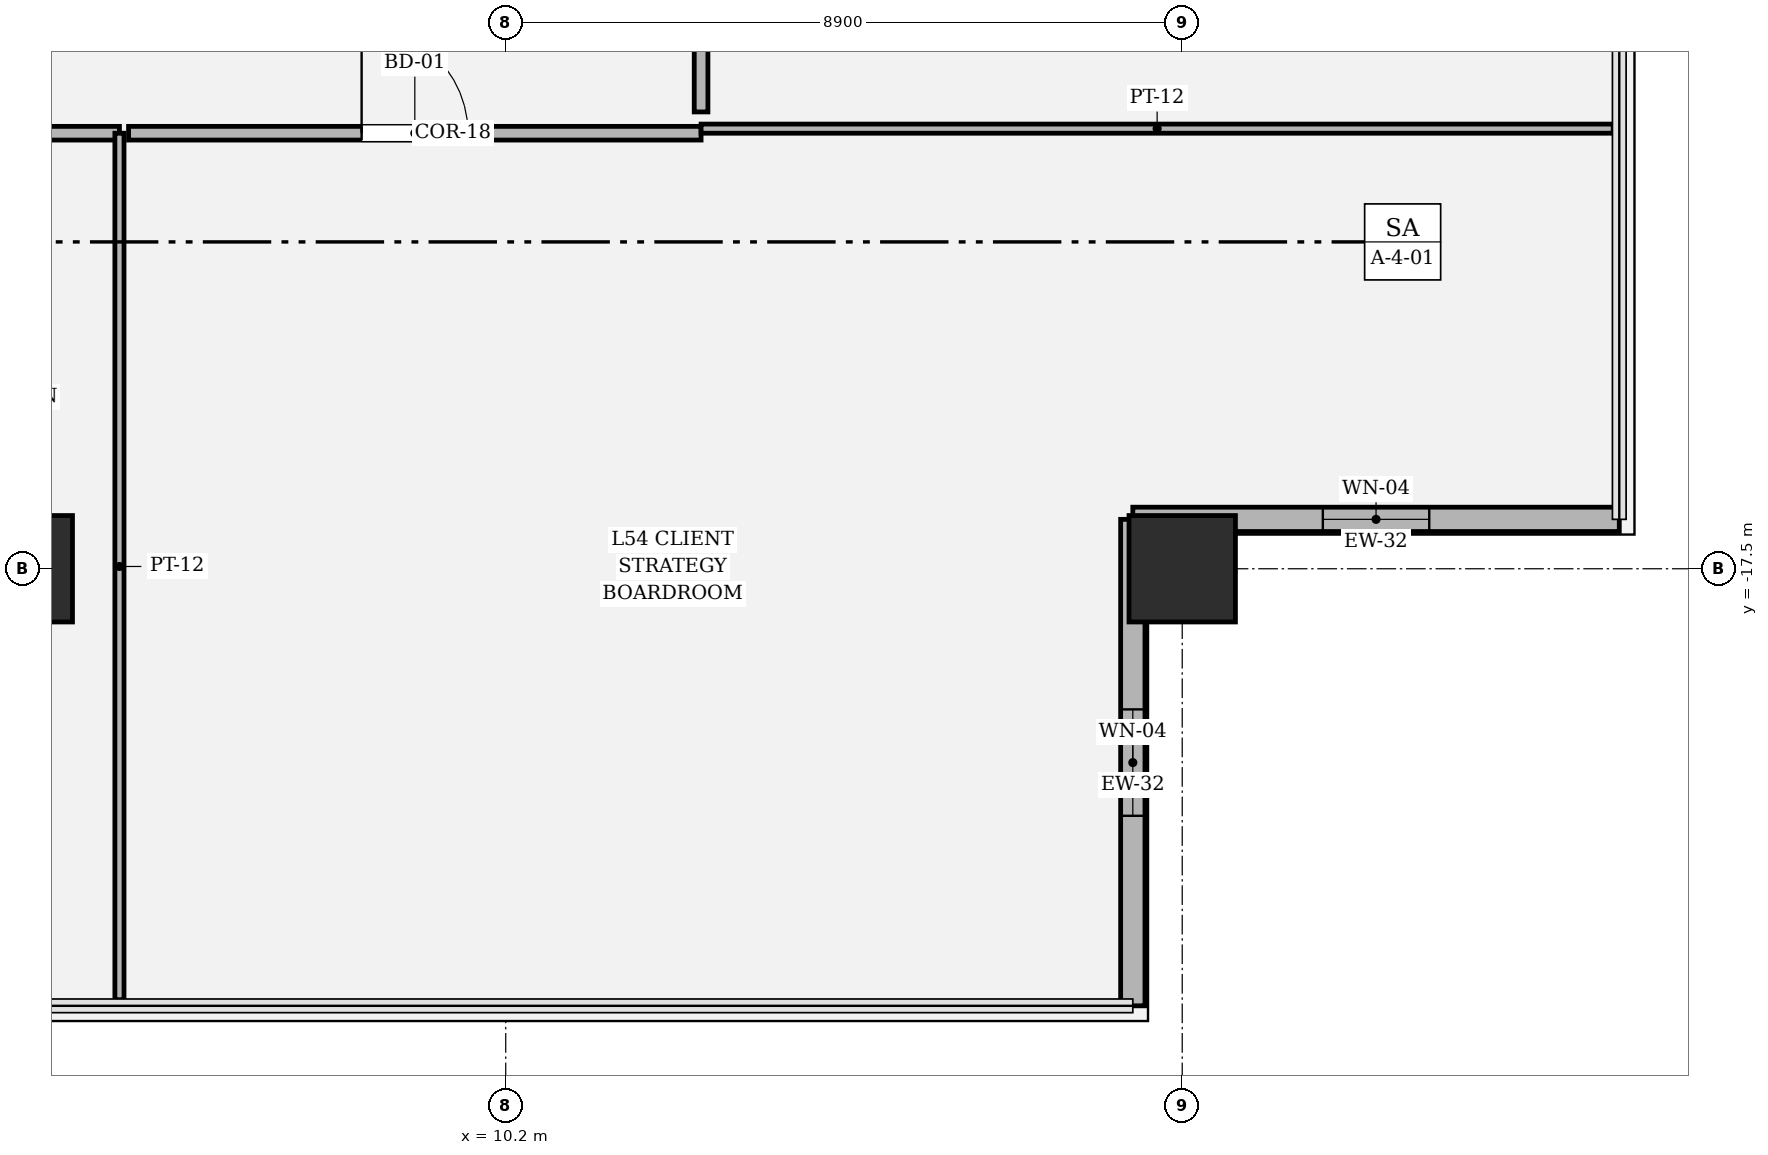
"""IFC4 building model, lengths in metres.
Left out: names, types, materials, properties, quantities, classifications, styles, units other than length and angle.
Written with IfcOpenShell. Run it as: python <this file> out.ifc"""

import sys

from ifc_helpers import new_model, si_unit, direction, frame, frame_2d, origin, origin_2d, place, context, subcontext, project, spatial, rectangle, hollow_rectangle, extrude, element, fill, save


model = new_model("IFC4")
c1 = context("Model", 3, precision=1e-05, world=origin(), true_north=direction((0.0, 1.0)))
c2 = subcontext(c1, "Body", "Model", "MODEL_VIEW")
j1 = project(units=[si_unit("LENGTHUNIT", "METRE"), si_unit("PLANEANGLEUNIT", "RADIAN")], contexts=[c1])
p1 = place(None, origin())
s1 = spatial("IfcSite", under=j1, at=p1, CompositionType="ELEMENT")
p2 = place(p1, origin())
s2 = spatial("IfcBuilding", under=s1, at=p2, CompositionType="ELEMENT")
p3 = place(p2, frame((0.0, 0.0, 228.9)))
s3 = spatial("IfcBuildingStorey", under=s2, at=p3, CompositionType="ELEMENT", Elevation=228.9)
for number, where, z_axis, x_axis in (
    (1, (3.8, -17.5, 0.0), (0.0, 0.0, 1.0), (1.0, 0.0, 0.0)),
    (2, (19.1, -17.5, 0.0), (0.0, 0.0, 1.0), (1.0, 0.0, 0.0)),
):
    element("IfcColumn", number, at=place(p3, frame(where, z_axis=z_axis, x_axis=x_axis)), inside=s3, PredefinedType="COLUMN", context=c2, shape_type="SweptSolid", body=[
        extrude(hollow_rectangle(XDim=1.4, YDim=1.4, WallThickness=0.042, at=origin_2d()), origin(), (0.0, 0.0, 1.0), 4.05),
    ])
p4 = place(p3, frame((18.45, -23.25, 0.0), z_axis=(0.0, 0.0, 1.0), x_axis=(0.0, 1.0, 0.0)))
e3 = element("IfcWall", 3, at=p4, inside=s3, PredefinedType="SOLIDWALL", context=c2, shape_type="SweptSolid", body=[
    extrude(rectangle(XDim=6.4, YDim=0.32, at=frame_2d((3.2, 0.0))), origin(), (0.0, 0.0, 1.0), 3.174),
])
p5 = place(p4, frame((2.5, 0.0, 0.734)))
e4 = element("IfcOpeningElement", 4, at=p5, cuts=e3, PredefinedType="OPENING", context=c2, shape_type="SweptSolid", body=[
    extrude(rectangle(XDim=1.4, YDim=2.2, at=frame_2d((0.7, 1.1))), frame((0.0, 0.17, 0.0), z_axis=(0.0, -1.0, 0.0), x_axis=(1.0, 0.0, 0.0)), (0.0, 0.0, 1.0), 0.34),
])
p6 = place(p3, frame((18.45, -16.85, 0.0), z_axis=(0.0, 0.0, 1.0), x_axis=(1.0, 0.0, 0.0)))
e5 = element("IfcWall", 5, at=p6, inside=s3, PredefinedType="SOLIDWALL", context=c2, shape_type="SweptSolid", body=[
    extrude(rectangle(XDim=6.4, YDim=0.32, at=frame_2d((3.2, 0.0))), origin(), (0.0, 0.0, 1.0), 3.174),
])
p7 = place(p6, frame((2.5, 0.0, 0.734)))
e6 = element("IfcOpeningElement", 6, at=p7, cuts=e5, PredefinedType="OPENING", context=c2, shape_type="SweptSolid", body=[
    extrude(rectangle(XDim=1.4, YDim=2.2, at=frame_2d((0.7, 1.1))), frame((0.0, 0.17, 0.0), z_axis=(0.0, -1.0, 0.0), x_axis=(1.0, 0.0, 0.0)), (0.0, 0.0, 1.0), 0.34),
])
p8 = place(p3, frame((1.2, -11.77, 0.0), z_axis=(0.0, 0.0, 1.0), x_axis=(1.0, 0.0, 0.0)))
e7 = element("IfcWall", 7, at=p8, inside=s3, PredefinedType="PARTITIONING", context=c2, shape_type="SweptSolid", body=[
    extrude(rectangle(XDim=3.918, YDim=0.18, at=frame_2d((1.959, 0.0))), origin(), (0.0, 0.0, 1.0), 3.174),
])
p9 = place(p3, frame((5.118, -11.77, 0.0), z_axis=(0.0, 0.0, 1.0), x_axis=(0.0, -1.0, 0.0)))
e8 = element("IfcWall", 8, at=p9, inside=s3, PredefinedType="PARTITIONING", context=c2, shape_type="SweptSolid", body=[
    extrude(rectangle(XDim=11.4, YDim=0.12, at=frame_2d((5.7, 0.0))), origin(), (0.0, 0.0, 1.0), 3.174),
])
p10 = place(p3, frame((5.238, -11.77, 0.0), z_axis=(0.0, 0.0, 1.0), x_axis=(1.0, 0.0, 0.0)))
e9 = element("IfcWall", 9, at=p10, inside=s3, PredefinedType="PARTITIONING", context=c2, shape_type="SweptSolid", body=[
    extrude(rectangle(XDim=7.532, YDim=0.18, at=frame_2d((3.766, 0.0))), origin(), (0.0, 0.0, 1.0), 3.174),
])
p11 = place(p10, frame((3.066, 0.0, 0.0)))
e10 = element("IfcOpeningElement", 10, at=p11, cuts=e9, PredefinedType="OPENING", context=c2, shape_type="SweptSolid", body=[
    extrude(rectangle(XDim=1.4, YDim=2.25, at=frame_2d((0.7, 1.125))), frame((0.0, 0.1, 0.0), z_axis=(0.0, -1.0, 0.0), x_axis=(1.0, 0.0, 0.0)), (0.0, 0.0, 1.0), 0.2),
])
p12 = place(p3, frame((12.77, -11.71, 0.0), z_axis=(0.0, 0.0, 1.0), x_axis=(1.0, 0.0, 0.0)))
e11 = element("IfcWall", 11, at=p12, inside=s3, PredefinedType="PARTITIONING", context=c2, shape_type="SweptSolid", body=[
    extrude(rectangle(XDim=12.0, YDim=0.12, at=frame_2d((6.0, 0.0))), origin(), (0.0, 0.0, 1.0), 3.174),
])
p13 = place(p3, frame((12.77, -11.49, 0.0), z_axis=(0.0, 0.0, 1.0), x_axis=(0.0, 1.0, 0.0)))
e12 = element("IfcWall", 12, at=p13, inside=s3, PredefinedType="PARTITIONING", context=c2, shape_type="SweptSolid", body=[
    extrude(rectangle(XDim=11.546, YDim=0.18, at=frame_2d((5.773, 0.0))), origin(), (0.0, 0.0, 1.0), 3.174),
])
p14 = place(p13, frame((5.248, 0.0, 0.0)))
e13 = element("IfcOpeningElement", 13, at=p14, cuts=e12, PredefinedType="OPENING", context=c2, shape_type="SweptSolid", body=[
    extrude(rectangle(XDim=1.05, YDim=2.2, at=frame_2d((0.525, 1.1))), frame((0.0, 0.1, 0.0), z_axis=(0.0, -1.0, 0.0), x_axis=(1.0, 0.0, 0.0)), (0.0, 0.0, 1.0), 0.2),
])
p15 = place(p5, origin())
e14 = element("IfcWindow", 14, at=p15, inside=s3, PartitioningType="SINGLE_PANEL", PredefinedType="WINDOW", context=c2, shape_type="SweptSolid", body=[
    extrude(rectangle(XDim=1.4, YDim=2.2, at=frame_2d((0.7, 1.1))), frame((0.0, 0.03, 0.0), z_axis=(0.0, -1.0, 0.0), x_axis=(1.0, 0.0, 0.0)), (0.0, 0.0, 1.0), 0.06),
])
fill(e4, e14)
p16 = place(p7, origin())
e15 = element("IfcWindow", 15, at=p16, inside=s3, PartitioningType="SINGLE_PANEL", PredefinedType="WINDOW", context=c2, shape_type="SweptSolid", body=[
    extrude(rectangle(XDim=1.4, YDim=2.2, at=frame_2d((0.7, 1.1))), frame((0.0, 0.03, 0.0), z_axis=(0.0, -1.0, 0.0), x_axis=(1.0, 0.0, 0.0)), (0.0, 0.0, 1.0), 0.06),
])
fill(e6, e15)
p17 = place(p11, origin())
e16 = element("IfcDoor", 16, at=p17, inside=s3, OperationType="SINGLE_SWING_LEFT", PredefinedType="DOOR", context=c2, shape_type="SweptSolid", body=[
    extrude(rectangle(XDim=1.4, YDim=2.25, at=frame_2d((0.7, 1.125))), frame((0.0, 0.025, 0.0), z_axis=(0.0, -1.0, 0.0), x_axis=(1.0, 0.0, 0.0)), (0.0, 0.0, 1.0), 0.05),
])
fill(e10, e16)
save(model, sys.argv[1])
